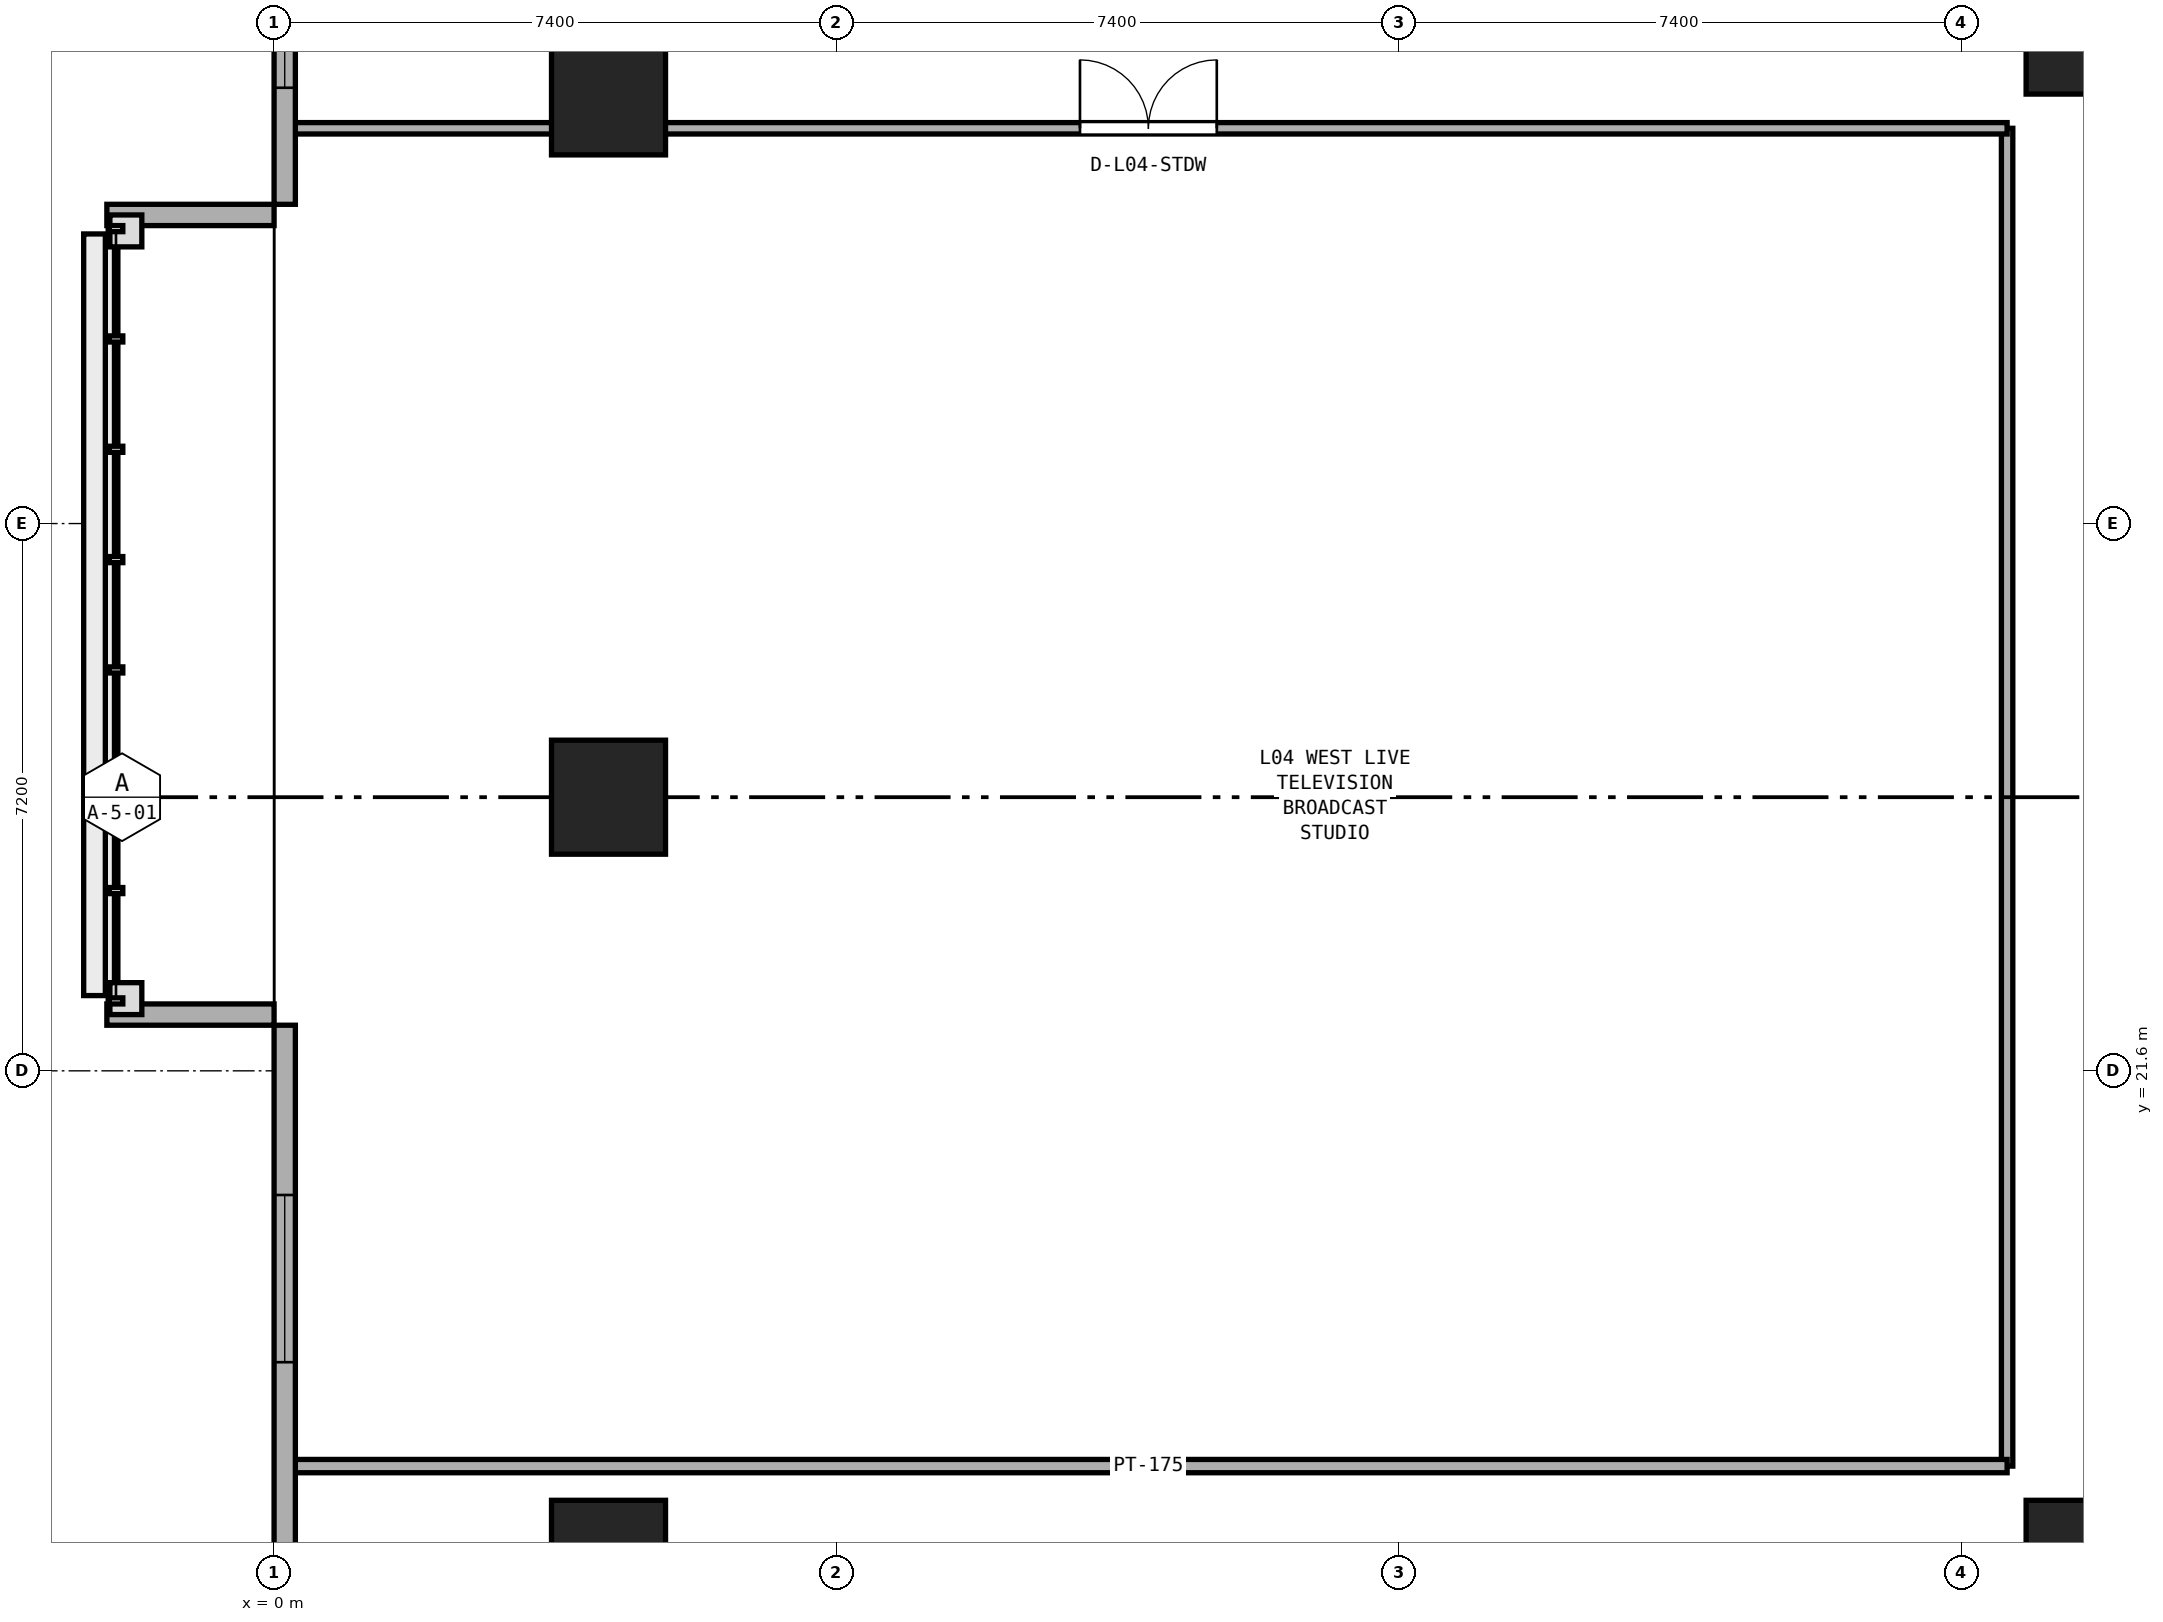
"""IFC4 building model, lengths in metres.
Left out: names, types, materials, properties, quantities, classifications, styles, units other than length and angle.
Written with IfcOpenShell. Run it as: python <this file> out.ifc"""

import sys

from ifc_helpers import new_model, si_unit, direction, frame, frame_2d, origin, origin_2d, place, context, subcontext, project, spatial, rectangle, extrude, element, fill, save


model = new_model("IFC4")
c1 = context("Model", 3, precision=1e-05, world=origin(), true_north=direction((0.0, 1.0)))
c2 = subcontext(c1, "Body", "Model", "MODEL_VIEW")
j1 = project(units=[si_unit("LENGTHUNIT", "METRE"), si_unit("PLANEANGLEUNIT", "RADIAN")], contexts=[c1])
p1 = place(None, origin())
s1 = spatial("IfcSite", under=j1, at=p1, CompositionType="ELEMENT")
p2 = place(p1, origin())
s2 = spatial("IfcBuilding", under=s1, at=p2, CompositionType="ELEMENT")
p3 = place(p2, frame((0.0, 0.0, 20.0)))
s3 = spatial("IfcBuildingStorey", under=s2, at=p3, CompositionType="ELEMENT", Elevation=20.0)
for number, where, z_axis, x_axis in (
    (1, (4.4, 15.2, 0.0), (0.0, 0.0, 1.0), (1.0, 0.0, 0.0)),
    (2, (4.4, 25.2, 0.0), (0.0, 0.0, 1.0), (1.0, 0.0, 0.0)),
    (3, (4.4, 34.4, 0.0), (0.0, 0.0, 1.0), (1.0, 0.0, 0.0)),
    (4, (23.8, 15.2, 0.0), (0.0, 0.0, 1.0), (1.0, 0.0, 0.0)),
    (5, (23.8, 35.2, 0.0), (0.0, 0.0, 1.0), (1.0, 0.0, 0.0)),
):
    element("IfcColumn", number, at=place(p3, frame(where, z_axis=z_axis, x_axis=x_axis)), inside=s3, PredefinedType="COLUMN", context=c2, shape_type="SweptSolid", body=[
        extrude(rectangle(XDim=1.5, YDim=1.5, at=origin_2d()), origin(), (0.0, 0.0, 1.0), 5.0),
    ])
p4 = place(p3, frame((22.8, 16.4, 0.0), z_axis=(0.0, 0.0, 1.0), x_axis=(0.0, 1.0, 0.0)))
e6 = element("IfcWall", 6, at=p4, inside=s3, PredefinedType="PARTITIONING", context=c2, shape_type="SweptSolid", body=[
    extrude(rectangle(XDim=17.6, YDim=0.15, at=frame_2d((8.8, 0.0))), origin(), (0.0, 0.0, 1.0), 4.6),
])
p5 = place(p3, frame((0.205, 16.4, 0.0), z_axis=(0.0, 0.0, 1.0), x_axis=(1.0, 0.0, 0.0)))
e7 = element("IfcWall", 7, at=p5, inside=s3, PredefinedType="PARTITIONING", context=c2, shape_type="SweptSolid", body=[
    extrude(rectangle(XDim=22.595, YDim=0.175, at=frame_2d((11.297, 0.0))), origin(), (0.0, 0.0, 1.0), 2.2),
])
p6 = place(p3, frame((0.205, 34.0, 0.0), z_axis=(0.0, 0.0, 1.0), x_axis=(1.0, 0.0, 0.0)))
e8 = element("IfcWall", 8, at=p6, inside=s3, PredefinedType="PARTITIONING", context=c2, shape_type="SweptSolid", body=[
    extrude(rectangle(XDim=22.595, YDim=0.15, at=frame_2d((11.297, 0.0))), origin(), (0.0, 0.0, 1.0), 2.2),
])
p7 = place(p6, frame((10.397, 0.0, 0.0)))
e9 = element("IfcOpeningElement", 9, at=p7, cuts=e8, PredefinedType="OPENING", context=c2, shape_type="SweptSolid", body=[
    extrude(rectangle(XDim=1.8, YDim=2.15, at=frame_2d((0.9, 1.075))), frame((0.0, 0.085, 0.0), z_axis=(0.0, -1.0, 0.0), x_axis=(1.0, 0.0, 0.0)), (0.0, 0.0, 1.0), 0.17),
])
p8 = place(p3, frame((0.14, 46.2, 0.0), z_axis=(0.0, 0.0, 1.0), x_axis=(0.0, -1.0, 0.0)))
e10 = element("IfcWall", 10, at=p8, inside=s3, PredefinedType="STANDARD", context=c2, shape_type="SweptSolid", body=[
    extrude(rectangle(XDim=13.2, YDim=0.28, at=frame_2d((6.6, 0.0))), origin(), (0.0, 0.0, 1.0), 3.7),
])
p9 = place(p8, frame((1.033, 0.0, 0.9)))
e11 = element("IfcOpeningElement", 11, at=p9, cuts=e10, PredefinedType="OPENING", context=c2, shape_type="SweptSolid", body=[
    extrude(rectangle(XDim=3.0, YDim=2.2, at=frame_2d((1.5, 1.1))), frame((0.0, 0.15, 0.0), z_axis=(0.0, -1.0, 0.0), x_axis=(1.0, 0.0, 0.0)), (0.0, 0.0, 1.0), 0.3),
])
p10 = place(p8, frame((5.1, 0.0, 0.9)))
e12 = element("IfcOpeningElement", 12, at=p10, cuts=e10, PredefinedType="OPENING", context=c2, shape_type="SweptSolid", body=[
    extrude(rectangle(XDim=3.0, YDim=2.2, at=frame_2d((1.5, 1.1))), frame((0.0, 0.15, 0.0), z_axis=(0.0, -1.0, 0.0), x_axis=(1.0, 0.0, 0.0)), (0.0, 0.0, 1.0), 0.3),
])
p11 = place(p8, frame((8.667, 0.0, 0.9)))
e13 = element("IfcOpeningElement", 13, at=p11, cuts=e10, PredefinedType="OPENING", context=c2, shape_type="SweptSolid", body=[
    extrude(rectangle(XDim=3.0, YDim=2.2, at=frame_2d((1.5, 1.1))), frame((0.0, 0.15, 0.0), z_axis=(0.0, -1.0, 0.0), x_axis=(1.0, 0.0, 0.0)), (0.0, 0.0, 1.0), 0.3),
])
p12 = place(p3, frame((0.14, 22.2, 0.0), z_axis=(0.0, 0.0, 1.0), x_axis=(0.0, -1.0, 0.0)))
e14 = element("IfcWall", 14, at=p12, inside=s3, PredefinedType="STANDARD", context=c2, shape_type="SweptSolid", body=[
    extrude(rectangle(XDim=18.0, YDim=0.28, at=frame_2d((9.0, 0.0))), origin(), (0.0, 0.0, 1.0), 3.7),
])
p13 = place(p12, frame((2.233, 0.0, 0.9)))
e15 = element("IfcOpeningElement", 15, at=p13, cuts=e14, PredefinedType="OPENING", context=c2, shape_type="SweptSolid", body=[
    extrude(rectangle(XDim=2.2, YDim=1.95, at=frame_2d((1.1, 0.975))), frame((0.0, 0.15, 0.0), z_axis=(0.0, -1.0, 0.0), x_axis=(1.0, 0.0, 0.0)), (0.0, 0.0, 1.0), 0.3),
])
p14 = place(p12, frame((13.567, 0.0, 0.9)))
e16 = element("IfcOpeningElement", 16, at=p14, cuts=e14, PredefinedType="OPENING", context=c2, shape_type="SweptSolid", body=[
    extrude(rectangle(XDim=2.2, YDim=1.95, at=frame_2d((1.1, 0.975))), frame((0.0, 0.15, 0.0), z_axis=(0.0, -1.0, 0.0), x_axis=(1.0, 0.0, 0.0)), (0.0, 0.0, 1.0), 0.3),
])
for number, where, z_axis, x_axis in (
    (17, (-2.2, 22.34, 0.0), (0.0, 0.0, 1.0), (1.0, 0.0, 0.0)),
    (18, (-2.2, 32.86, 0.0), (0.0, 0.0, 1.0), (1.0, 0.0, 0.0)),
):
    element("IfcWall", number, at=place(p3, frame(where, z_axis=z_axis, x_axis=x_axis)), inside=s3, PredefinedType="STANDARD", context=c2, shape_type="SweptSolid", body=[
        extrude(rectangle(XDim=2.2, YDim=0.28, at=frame_2d((1.1, 0.0))), origin(), (0.0, 0.0, 1.0), 3.907),
    ])
p15 = place(p7, origin())
e19 = element("IfcDoor", 19, at=p15, inside=s3, OperationType="DOUBLE_DOOR_SINGLE_SWING", PredefinedType="DOOR", context=c2, shape_type="SweptSolid", body=[
    extrude(rectangle(XDim=1.8, YDim=2.15, at=frame_2d((0.9, 1.075))), frame((0.0, 0.025, 0.0), z_axis=(0.0, -1.0, 0.0), x_axis=(1.0, 0.0, 0.0)), (0.0, 0.0, 1.0), 0.05),
])
fill(e9, e19)
p16 = place(p11, origin())
e20 = element("IfcWindow", 20, at=p16, inside=s3, PartitioningType="SINGLE_PANEL", PredefinedType="WINDOW", context=c2, shape_type="SweptSolid", body=[
    extrude(rectangle(XDim=3.0, YDim=2.2, at=frame_2d((1.5, 1.1))), frame((0.0, 0.03, 0.0), z_axis=(0.0, -1.0, 0.0), x_axis=(1.0, 0.0, 0.0)), (0.0, 0.0, 1.0), 0.06),
])
fill(e13, e20)
p17 = place(p13, origin())
e21 = element("IfcWindow", 21, at=p17, inside=s3, PartitioningType="SINGLE_PANEL", PredefinedType="WINDOW", context=c2, shape_type="SweptSolid", body=[
    extrude(rectangle(XDim=2.2, YDim=1.95, at=frame_2d((1.1, 0.975))), frame((0.0, 0.03, 0.0), z_axis=(0.0, -1.0, 0.0), x_axis=(1.0, 0.0, 0.0)), (0.0, 0.0, 1.0), 0.06),
])
fill(e15, e21)
save(model, sys.argv[1])
